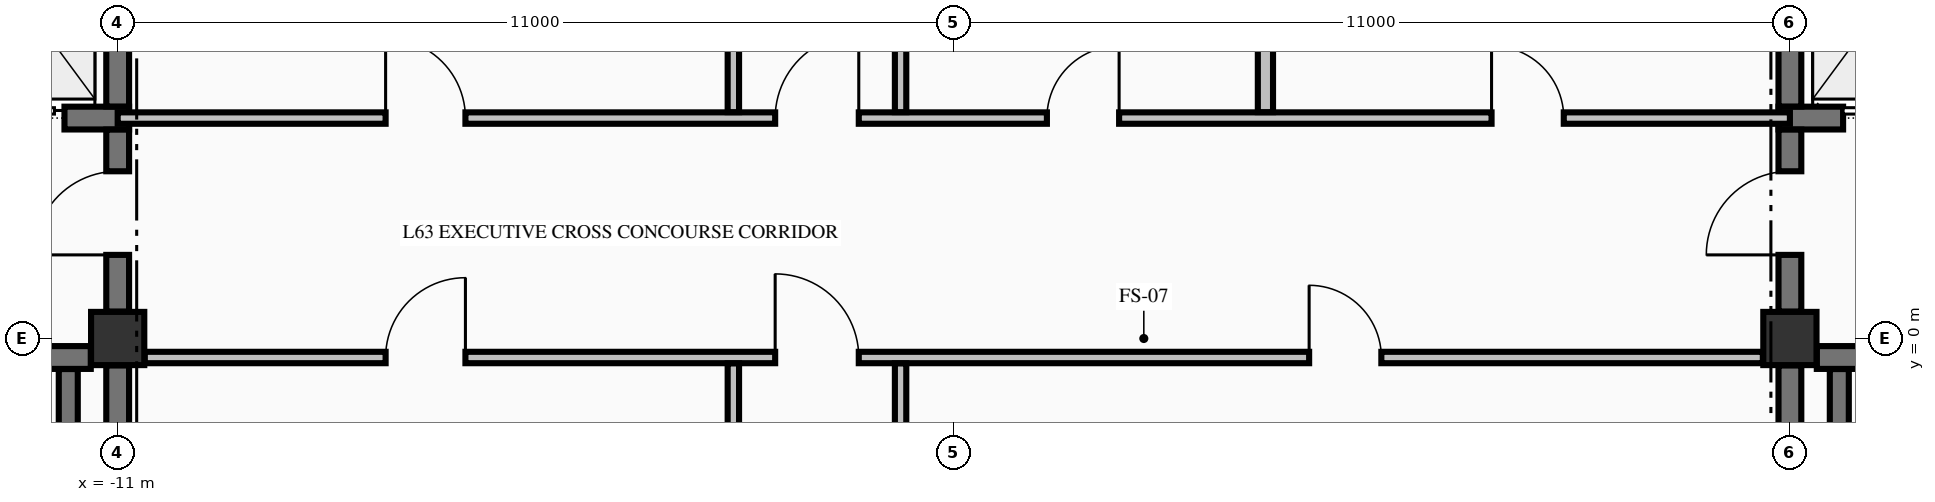
"""IFC4 building model, lengths in metres.
Left out: names, types, materials, properties, quantities, classifications, styles, units other than length and angle.
Written with IfcOpenShell. Run it as: python <this file> out.ifc"""

import sys

from ifc_helpers import new_model, si_unit, direction, frame, frame_2d, origin, origin_2d, place, context, subcontext, project, spatial, rectangle, extrude, element, fill, save


model = new_model("IFC4")
c1 = context("Model", 3, precision=1e-05, world=origin(), true_north=direction((0.0, 1.0)))
c2 = subcontext(c1, "Body", "Model", "MODEL_VIEW")
j1 = project(units=[si_unit("LENGTHUNIT", "METRE"), si_unit("PLANEANGLEUNIT", "RADIAN")], contexts=[c1])
p1 = place(None, origin())
s1 = spatial("IfcSite", under=j1, at=p1, CompositionType="ELEMENT")
p2 = place(p1, origin())
s2 = spatial("IfcBuilding", under=s1, at=p2, CompositionType="ELEMENT")
p3 = place(p2, frame((0.0, 0.0, 239.74)))
s3 = spatial("IfcBuildingStorey", under=s2, at=p3, CompositionType="ELEMENT", Elevation=239.74)
for number, where, z_axis, x_axis in (
    (1, (-11.0, 0.0, -0.25), (0.0, 0.0, 1.0), (1.0, 0.0, 0.0)),
    (2, (11.0, 0.0, -0.25), (0.0, 0.0, 1.0), (1.0, 0.0, 0.0)),
):
    element("IfcColumn", number, at=place(p3, frame(where, z_axis=z_axis, x_axis=x_axis)), inside=s3, PredefinedType="COLUMN", context=c2, shape_type="SweptSolid", body=[
        extrude(rectangle(XDim=0.7, YDim=0.7, at=origin_2d()), origin(), (0.0, 0.0, 1.0), 3.23),
    ])
p4 = place(p3, frame((-20.571, -0.25, 0.0), z_axis=(0.0, 0.0, 1.0), x_axis=(1.0, 0.0, 0.0)))
e3 = element("IfcWall", 3, at=p4, inside=s3, PredefinedType="SHEAR", context=c2, shape_type="SweptSolid", body=[
    extrude(rectangle(XDim=9.217, YDim=0.3, at=frame_2d((4.608, 0.0))), origin(), (0.0, 0.0, 1.0), 2.98),
])
p5 = place(p4, frame((6.871, 0.0, 0.0)))
e4 = element("IfcOpeningElement", 4, at=p5, cuts=e3, PredefinedType="OPENING", context=c2, shape_type="SweptSolid", body=[
    extrude(rectangle(XDim=1.1, YDim=2.15, at=frame_2d((0.55, 1.075))), frame((0.0, 0.16, 0.0), z_axis=(0.0, -1.0, 0.0), x_axis=(1.0, 0.0, 0.0)), (0.0, 0.0, 1.0), 0.32),
])
p6 = place(p3, frame((11.354, -0.25, 0.0), z_axis=(0.0, 0.0, 1.0), x_axis=(1.0, 0.0, 0.0)))
e5 = element("IfcWall", 5, at=p6, inside=s3, PredefinedType="SHEAR", context=c2, shape_type="SweptSolid", body=[
    extrude(rectangle(XDim=3.521, YDim=0.3, at=frame_2d((1.76, 0.0))), origin(), (0.0, 0.0, 1.0), 2.98),
])
p7 = place(p6, frame((1.246, 0.0, 0.0)))
e6 = element("IfcOpeningElement", 6, at=p7, cuts=e5, PredefinedType="OPENING", context=c2, shape_type="SweptSolid", body=[
    extrude(rectangle(XDim=1.1, YDim=2.15, at=frame_2d((0.55, 1.075))), frame((0.0, 0.16, 0.0), z_axis=(0.0, -1.0, 0.0), x_axis=(1.0, 0.0, 0.0)), (0.0, 0.0, 1.0), 0.32),
])
p8 = place(p3, frame((-14.875, 2.9, 0.0), z_axis=(0.0, 0.0, 1.0), x_axis=(1.0, 0.0, 0.0)))
e7 = element("IfcWall", 7, at=p8, inside=s3, PredefinedType="SHEAR", context=c2, shape_type="SweptSolid", body=[
    extrude(rectangle(XDim=4.025, YDim=0.3, at=frame_2d((2.012, 0.0))), origin(), (0.0, 0.0, 1.0), 2.98),
])
p9 = place(p8, frame((2.075, 0.0, 0.0)))
e8 = element("IfcOpeningElement", 8, at=p9, cuts=e7, PredefinedType="OPENING", context=c2, shape_type="SweptSolid", body=[
    extrude(rectangle(XDim=1.1, YDim=2.2, at=frame_2d((0.55, 1.1))), frame((0.0, 0.16, 0.0), z_axis=(0.0, -1.0, 0.0), x_axis=(1.0, 0.0, 0.0)), (0.0, 0.0, 1.0), 0.32),
])
p10 = place(p3, frame((10.85, 2.9, 0.0), z_axis=(0.0, 0.0, 1.0), x_axis=(1.0, 0.0, 0.0)))
e9 = element("IfcWall", 9, at=p10, inside=s3, PredefinedType="SHEAR", context=c2, shape_type="SweptSolid", body=[
    extrude(rectangle(XDim=4.025, YDim=0.3, at=frame_2d((2.012, 0.0))), origin(), (0.0, 0.0, 1.0), 2.98),
])
p11 = place(p10, frame((0.85, 0.0, 0.0)))
e10 = element("IfcOpeningElement", 10, at=p11, cuts=e9, PredefinedType="OPENING", context=c2, shape_type="SweptSolid", body=[
    extrude(rectangle(XDim=1.1, YDim=2.2, at=frame_2d((0.55, 1.1))), frame((0.0, 0.16, 0.0), z_axis=(0.0, -1.0, 0.0), x_axis=(1.0, 0.0, 0.0)), (0.0, 0.0, 1.0), 0.32),
])
p12 = place(p3, frame((-10.644, -0.25, 0.0), z_axis=(0.0, 0.0, 1.0), x_axis=(1.0, 0.0, 0.0)))
e11 = element("IfcWall", 11, at=p12, inside=s3, PredefinedType="PARTITIONING", context=c2, shape_type="SweptSolid", body=[
    extrude(rectangle(XDim=21.288, YDim=0.15, at=frame_2d((10.644, 0.0))), origin(), (0.0, 0.0, 1.0), 2.98),
])
p13 = place(p12, frame((8.294, 0.0, 0.0)))
e12 = element("IfcOpeningElement", 12, at=p13, cuts=e11, PredefinedType="OPENING", context=c2, shape_type="SweptSolid", body=[
    extrude(rectangle(XDim=1.1, YDim=2.15, at=frame_2d((0.55, 1.075))), frame((0.0, 0.085, 0.0), z_axis=(0.0, -1.0, 0.0), x_axis=(1.0, 0.0, 0.0)), (0.0, 0.0, 1.0), 0.17),
])
p14 = place(p12, frame((3.169, 0.0, 0.0)))
e13 = element("IfcOpeningElement", 13, at=p14, cuts=e11, PredefinedType="OPENING", context=c2, shape_type="SweptSolid", body=[
    extrude(rectangle(XDim=1.05, YDim=2.15, at=frame_2d((0.525, 1.075))), frame((0.0, 0.085, 0.0), z_axis=(0.0, -1.0, 0.0), x_axis=(1.0, 0.0, 0.0)), (0.0, 0.0, 1.0), 0.17),
])
p15 = place(p12, frame((15.319, 0.0, 0.0)))
e14 = element("IfcOpeningElement", 14, at=p15, cuts=e11, PredefinedType="OPENING", context=c2, shape_type="SweptSolid", body=[
    extrude(rectangle(XDim=0.95, YDim=2.15, at=frame_2d((0.475, 1.075))), frame((0.0, 0.085, 0.0), z_axis=(0.0, -1.0, 0.0), x_axis=(1.0, 0.0, 0.0)), (0.0, 0.0, 1.0), 0.17),
])
p16 = place(p3, frame((-11.0, 2.9, 0.0), z_axis=(0.0, 0.0, 1.0), x_axis=(1.0, 0.0, 0.0)))
e15 = element("IfcWall", 15, at=p16, inside=s3, PredefinedType="PARTITIONING", context=c2, shape_type="SweptSolid", body=[
    extrude(rectangle(XDim=22.0, YDim=0.15, at=frame_2d((11.0, 0.0))), origin(), (0.0, 0.0, 1.0), 2.98),
])
p17 = place(p16, frame((8.65, 0.0, 0.0)))
e16 = element("IfcOpeningElement", 16, at=p17, cuts=e15, PredefinedType="OPENING", context=c2, shape_type="SweptSolid", body=[
    extrude(rectangle(XDim=1.1, YDim=2.15, at=frame_2d((0.55, 1.075))), frame((0.0, 0.085, 0.0), z_axis=(0.0, -1.0, 0.0), x_axis=(1.0, 0.0, 0.0)), (0.0, 0.0, 1.0), 0.17),
])
p18 = place(p16, frame((3.525, 0.0, 0.0)))
e17 = element("IfcOpeningElement", 17, at=p18, cuts=e15, PredefinedType="OPENING", context=c2, shape_type="SweptSolid", body=[
    extrude(rectangle(XDim=1.05, YDim=2.15, at=frame_2d((0.525, 1.075))), frame((0.0, 0.085, 0.0), z_axis=(0.0, -1.0, 0.0), x_axis=(1.0, 0.0, 0.0)), (0.0, 0.0, 1.0), 0.17),
])
p19 = place(p16, frame((12.225, 0.0, 0.0)))
e18 = element("IfcOpeningElement", 18, at=p19, cuts=e15, PredefinedType="OPENING", context=c2, shape_type="SweptSolid", body=[
    extrude(rectangle(XDim=0.95, YDim=2.15, at=frame_2d((0.475, 1.075))), frame((0.0, 0.085, 0.0), z_axis=(0.0, -1.0, 0.0), x_axis=(1.0, 0.0, 0.0)), (0.0, 0.0, 1.0), 0.17),
])
p20 = place(p16, frame((18.075, 0.0, 0.0)))
e19 = element("IfcOpeningElement", 19, at=p20, cuts=e15, PredefinedType="OPENING", context=c2, shape_type="SweptSolid", body=[
    extrude(rectangle(XDim=0.95, YDim=2.15, at=frame_2d((0.475, 1.075))), frame((0.0, 0.085, 0.0), z_axis=(0.0, -1.0, 0.0), x_axis=(1.0, 0.0, 0.0)), (0.0, 0.0, 1.0), 0.17),
])
p21 = place(p3, frame((-11.65, -9.798, 0.0), z_axis=(0.0, 0.0, 1.0), x_axis=(0.0, 1.0, 0.0)))
e20 = element("IfcWall", 20, at=p21, inside=s3, PredefinedType="SOLIDWALL", context=c2, shape_type="SweptSolid", body=[
    extrude(rectangle(XDim=9.396, YDim=0.25, at=frame_2d((4.698, 0.0))), origin(), (0.0, 0.0, 1.0), 2.98),
])
p22 = place(p3, frame((-11.0, -9.596, 0.0), z_axis=(0.0, 0.0, 1.0), x_axis=(0.0, 1.0, 0.0)))
e21 = element("IfcWall", 21, at=p22, inside=s3, PredefinedType="SHEAR", context=c2, shape_type="SweptSolid", body=[
    extrude(rectangle(XDim=9.242, YDim=0.3, at=frame_2d((4.621, 0.0))), origin(), (0.0, 0.0, 1.0), 2.98),
])
p23 = place(p3, frame((-11.0, 0.354, 0.0), z_axis=(0.0, 0.0, 1.0), x_axis=(0.0, 1.0, 0.0)))
e22 = element("IfcWall", 22, at=p23, inside=s3, PredefinedType="SHEAR", context=c2, shape_type="SweptSolid", body=[
    extrude(rectangle(XDim=2.394, YDim=0.3, at=frame_2d((1.197, 0.0))), origin(), (0.0, 0.0, 1.0), 2.98),
])
p24 = place(p23, frame((0.746, 0.0, 0.0)))
e23 = element("IfcOpeningElement", 23, at=p24, cuts=e22, PredefinedType="OPENING", context=c2, shape_type="SweptSolid", body=[
    extrude(rectangle(XDim=1.1, YDim=2.15, at=frame_2d((0.55, 1.075))), frame((0.0, 0.16, 0.0), z_axis=(0.0, -1.0, 0.0), x_axis=(1.0, 0.0, 0.0)), (0.0, 0.0, 1.0), 0.32),
])
p25 = place(p3, frame((-11.0, 3.052, 0.0), z_axis=(0.0, 0.0, 1.0), x_axis=(0.0, 1.0, 0.0)))
e24 = element("IfcWall", 24, at=p25, inside=s3, PredefinedType="SHEAR", context=c2, shape_type="SweptSolid", body=[
    extrude(rectangle(XDim=2.496, YDim=0.3, at=frame_2d((1.248, 0.0))), origin(), (0.0, 0.0, 1.0), 2.98),
])
p26 = place(p3, frame((11.0, -9.596, 0.0), z_axis=(0.0, 0.0, 1.0), x_axis=(0.0, 1.0, 0.0)))
e25 = element("IfcWall", 25, at=p26, inside=s3, PredefinedType="SHEAR", context=c2, shape_type="SweptSolid", body=[
    extrude(rectangle(XDim=9.242, YDim=0.3, at=frame_2d((4.621, 0.0))), origin(), (0.0, 0.0, 1.0), 2.98),
])
p27 = place(p3, frame((11.0, 0.354, 0.0), z_axis=(0.0, 0.0, 1.0), x_axis=(0.0, 1.0, 0.0)))
e26 = element("IfcWall", 26, at=p27, inside=s3, PredefinedType="SHEAR", context=c2, shape_type="SweptSolid", body=[
    extrude(rectangle(XDim=2.394, YDim=0.3, at=frame_2d((1.197, 0.0))), origin(), (0.0, 0.0, 1.0), 2.98),
])
p28 = place(p27, frame((0.746, 0.0, 0.0)))
e27 = element("IfcOpeningElement", 27, at=p28, cuts=e26, PredefinedType="OPENING", context=c2, shape_type="SweptSolid", body=[
    extrude(rectangle(XDim=1.1, YDim=2.15, at=frame_2d((0.55, 1.075))), frame((0.0, 0.16, 0.0), z_axis=(0.0, -1.0, 0.0), x_axis=(1.0, 0.0, 0.0)), (0.0, 0.0, 1.0), 0.32),
])
p29 = place(p3, frame((11.0, 3.052, 0.0), z_axis=(0.0, 0.0, 1.0), x_axis=(0.0, 1.0, 0.0)))
e28 = element("IfcWall", 28, at=p29, inside=s3, PredefinedType="SHEAR", context=c2, shape_type="SweptSolid", body=[
    extrude(rectangle(XDim=2.496, YDim=0.3, at=frame_2d((1.248, 0.0))), origin(), (0.0, 0.0, 1.0), 2.98),
])
p30 = place(p3, frame((11.65, -9.798, 0.0), z_axis=(0.0, 0.0, 1.0), x_axis=(0.0, 1.0, 0.0)))
e29 = element("IfcWall", 29, at=p30, inside=s3, PredefinedType="SOLIDWALL", context=c2, shape_type="SweptSolid", body=[
    extrude(rectangle(XDim=9.396, YDim=0.25, at=frame_2d((4.698, 0.0))), origin(), (0.0, 0.0, 1.0), 2.98),
])
p31 = place(p3, frame((-2.9, -9.872, 0.0), z_axis=(0.0, 0.0, 1.0), x_axis=(0.0, 1.0, 0.0)))
e30 = element("IfcWall", 30, at=p31, inside=s3, PredefinedType="PARTITIONING", context=c2, shape_type="SweptSolid", body=[
    extrude(rectangle(XDim=9.544, YDim=0.15, at=frame_2d((4.772, 0.0))), origin(), (0.0, 0.0, 1.0), 2.98),
])
p32 = place(p3, frame((-2.9, 2.978, 0.0), z_axis=(0.0, 0.0, 1.0), x_axis=(0.0, 1.0, 0.0)))
e31 = element("IfcWall", 31, at=p32, inside=s3, PredefinedType="PARTITIONING", context=c2, shape_type="SweptSolid", body=[
    extrude(rectangle(XDim=7.444, YDim=0.15, at=frame_2d((3.722, 0.0))), origin(), (0.0, 0.0, 1.0), 2.98),
])
p33 = place(p3, frame((-0.7, -4.147, 0.0), z_axis=(0.0, 0.0, 1.0), x_axis=(0.0, 1.0, 0.0)))
e32 = element("IfcWall", 32, at=p33, inside=s3, PredefinedType="PARTITIONING", context=c2, shape_type="SweptSolid", body=[
    extrude(rectangle(XDim=3.819, YDim=0.15, at=frame_2d((1.91, 0.0))), origin(), (0.0, 0.0, 1.0), 2.98),
])
p34 = place(p3, frame((-0.7, 2.978, 0.0), z_axis=(0.0, 0.0, 1.0), x_axis=(0.0, 1.0, 0.0)))
e33 = element("IfcWall", 33, at=p34, inside=s3, PredefinedType="PARTITIONING", context=c2, shape_type="SweptSolid", body=[
    extrude(rectangle(XDim=7.444, YDim=0.15, at=frame_2d((3.722, 0.0))), origin(), (0.0, 0.0, 1.0), 2.98),
])
p35 = place(p3, frame((4.1, 2.978, 0.0), z_axis=(0.0, 0.0, 1.0), x_axis=(0.0, 1.0, 0.0)))
e34 = element("IfcWall", 34, at=p35, inside=s3, PredefinedType="PARTITIONING", context=c2, shape_type="SweptSolid", body=[
    extrude(rectangle(XDim=7.444, YDim=0.2, at=frame_2d((3.722, 0.0))), origin(), (0.0, 0.0, 1.0), 2.98),
])
p36 = place(p24, origin())
e35 = element("IfcDoor", 35, at=p36, inside=s3, OperationType="SINGLE_SWING_LEFT", PredefinedType="DOOR", context=c2, shape_type="SweptSolid", body=[
    extrude(rectangle(XDim=1.1, YDim=2.15, at=frame_2d((0.55, 1.075))), frame((0.0, 0.025, 0.0), z_axis=(0.0, -1.0, 0.0), x_axis=(1.0, 0.0, 0.0)), (0.0, 0.0, 1.0), 0.05),
])
fill(e23, e35)
p37 = place(p9, origin())
e36 = element("IfcDoor", 36, at=p37, inside=s3, OperationType="SLIDING_TO_LEFT", PredefinedType="DOOR", context=c2, shape_type="SweptSolid", body=[
    extrude(rectangle(XDim=1.1, YDim=2.2, at=frame_2d((0.55, 1.1))), frame((0.0, 0.025, 0.0), z_axis=(0.0, -1.0, 0.0), x_axis=(1.0, 0.0, 0.0)), (0.0, 0.0, 1.0), 0.05),
])
fill(e8, e36)
p38 = place(p28, origin())
e37 = element("IfcDoor", 37, at=p38, inside=s3, OperationType="SINGLE_SWING_LEFT", PredefinedType="DOOR", context=c2, shape_type="SweptSolid", body=[
    extrude(rectangle(XDim=1.1, YDim=2.15, at=frame_2d((0.55, 1.075))), frame((0.0, 0.025, 0.0), z_axis=(0.0, -1.0, 0.0), x_axis=(1.0, 0.0, 0.0)), (0.0, 0.0, 1.0), 0.05),
])
fill(e27, e37)
p39 = place(p11, origin())
e38 = element("IfcDoor", 38, at=p39, inside=s3, OperationType="SLIDING_TO_RIGHT", PredefinedType="DOOR", context=c2, shape_type="SweptSolid", body=[
    extrude(rectangle(XDim=1.1, YDim=2.2, at=frame_2d((0.55, 1.1))), frame((0.0, 0.025, 0.0), z_axis=(0.0, -1.0, 0.0), x_axis=(1.0, 0.0, 0.0)), (0.0, 0.0, 1.0), 0.05),
])
fill(e10, e38)
p40 = place(p17, origin())
e39 = element("IfcDoor", 39, at=p40, inside=s3, OperationType="SINGLE_SWING_RIGHT", PredefinedType="DOOR", context=c2, shape_type="SweptSolid", body=[
    extrude(rectangle(XDim=1.1, YDim=2.15, at=frame_2d((0.55, 1.075))), frame((0.0, 0.025, 0.0), z_axis=(0.0, -1.0, 0.0), x_axis=(1.0, 0.0, 0.0)), (0.0, 0.0, 1.0), 0.05),
])
fill(e16, e39)
p41 = place(p13, origin())
e40 = element("IfcDoor", 40, at=p41, inside=s3, OperationType="SINGLE_SWING_LEFT", PredefinedType="DOOR", context=c2, shape_type="SweptSolid", body=[
    extrude(rectangle(XDim=1.1, YDim=2.15, at=frame_2d((0.55, 1.075))), frame((0.0, 0.025, 0.0), z_axis=(0.0, -1.0, 0.0), x_axis=(1.0, 0.0, 0.0)), (0.0, 0.0, 1.0), 0.05),
])
fill(e12, e40)
p42 = place(p18, origin())
e41 = element("IfcDoor", 41, at=p42, inside=s3, OperationType="SINGLE_SWING_LEFT", PredefinedType="DOOR", context=c2, shape_type="SweptSolid", body=[
    extrude(rectangle(XDim=1.05, YDim=2.15, at=frame_2d((0.525, 1.075))), frame((0.0, 0.025, 0.0), z_axis=(0.0, -1.0, 0.0), x_axis=(1.0, 0.0, 0.0)), (0.0, 0.0, 1.0), 0.05),
])
fill(e17, e41)
p43 = place(p19, origin())
e42 = element("IfcDoor", 42, at=p43, inside=s3, OperationType="SINGLE_SWING_RIGHT", PredefinedType="DOOR", context=c2, shape_type="SweptSolid", body=[
    extrude(rectangle(XDim=0.95, YDim=2.15, at=frame_2d((0.475, 1.075))), frame((0.0, 0.025, 0.0), z_axis=(0.0, -1.0, 0.0), x_axis=(1.0, 0.0, 0.0)), (0.0, 0.0, 1.0), 0.05),
])
fill(e18, e42)
p44 = place(p20, origin())
e43 = element("IfcDoor", 43, at=p44, inside=s3, OperationType="SINGLE_SWING_LEFT", PredefinedType="DOOR", context=c2, shape_type="SweptSolid", body=[
    extrude(rectangle(XDim=0.95, YDim=2.15, at=frame_2d((0.475, 1.075))), frame((0.0, 0.025, 0.0), z_axis=(0.0, -1.0, 0.0), x_axis=(1.0, 0.0, 0.0)), (0.0, 0.0, 1.0), 0.05),
])
fill(e19, e43)
p45 = place(p14, origin())
e44 = element("IfcDoor", 44, at=p45, inside=s3, OperationType="SINGLE_SWING_RIGHT", PredefinedType="DOOR", context=c2, shape_type="SweptSolid", body=[
    extrude(rectangle(XDim=1.05, YDim=2.15, at=frame_2d((0.525, 1.075))), frame((0.0, 0.025, 0.0), z_axis=(0.0, -1.0, 0.0), x_axis=(1.0, 0.0, 0.0)), (0.0, 0.0, 1.0), 0.05),
])
fill(e13, e44)
p46 = place(p15, origin())
e45 = element("IfcDoor", 45, at=p46, inside=s3, OperationType="SINGLE_SWING_LEFT", PredefinedType="DOOR", context=c2, shape_type="SweptSolid", body=[
    extrude(rectangle(XDim=0.95, YDim=2.15, at=frame_2d((0.475, 1.075))), frame((0.0, 0.025, 0.0), z_axis=(0.0, -1.0, 0.0), x_axis=(1.0, 0.0, 0.0)), (0.0, 0.0, 1.0), 0.05),
])
fill(e14, e45)
save(model, sys.argv[1])
